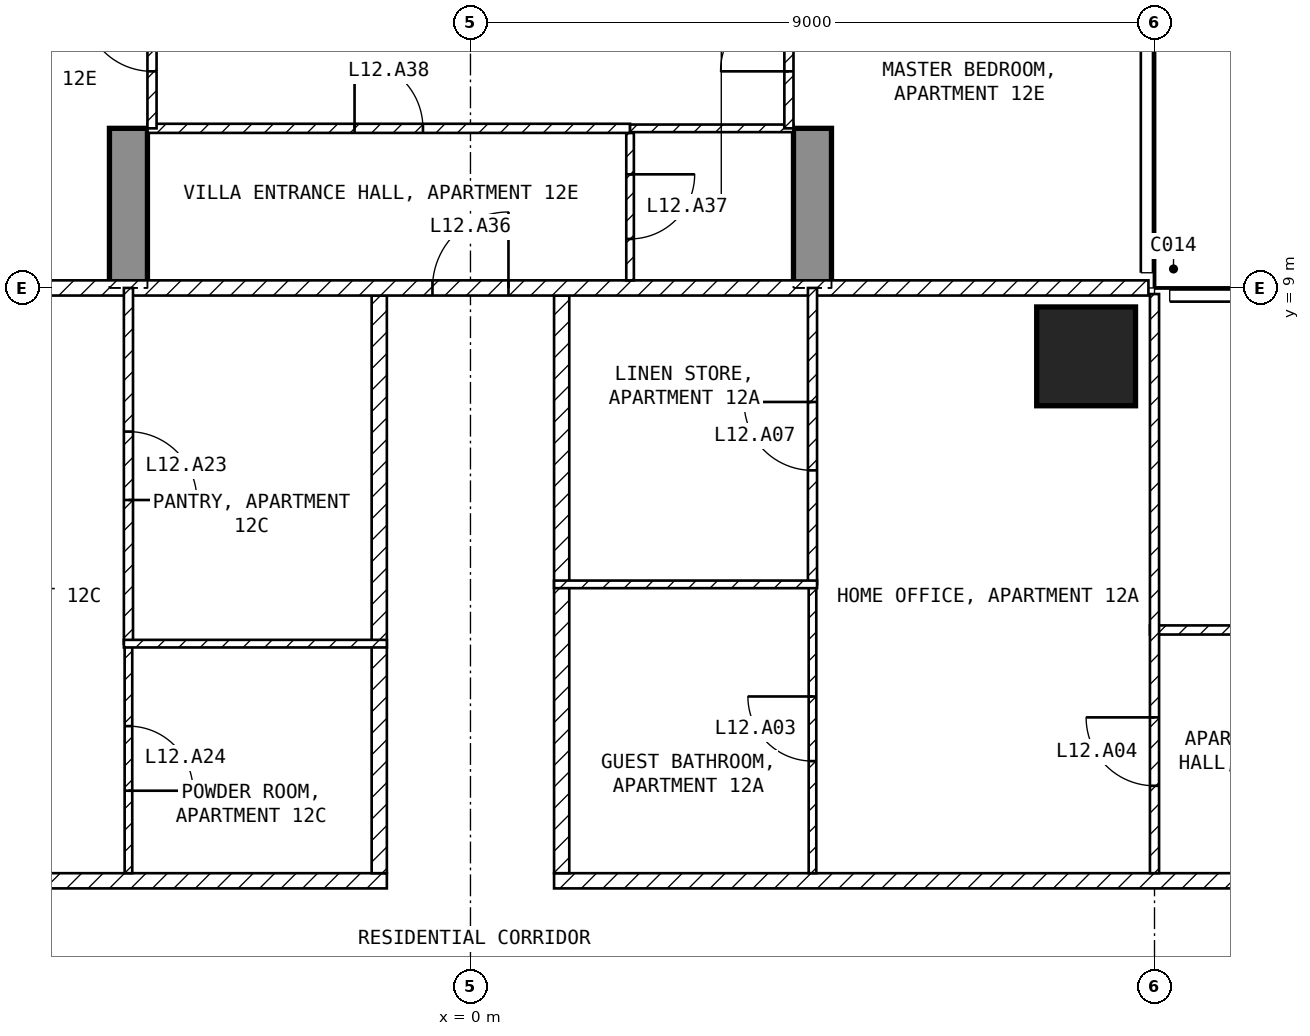
"""IFC4 building model, lengths in metres.
Left out: names, types, materials, properties, quantities, classifications, styles, units other than length and angle.
Written with IfcOpenShell. Run it as: python <this file> out.ifc"""

import sys

from ifc_helpers import new_model, si_unit, direction, frame, frame_2d, origin, origin_2d, place, context, subcontext, project, spatial, polyline, rectangle, outline, extrude, element, fill, save


model = new_model("IFC4")
c1 = context("Model", 3, precision=1e-05, world=origin(), true_north=direction((0.0, 1.0)))
c2 = subcontext(c1, "Body", "Model", "MODEL_VIEW")
j1 = project(units=[si_unit("LENGTHUNIT", "METRE"), si_unit("PLANEANGLEUNIT", "RADIAN")], contexts=[c1])
p1 = place(None, origin())
s1 = spatial("IfcSite", under=j1, at=p1, CompositionType="ELEMENT")
p2 = place(p1, origin())
s2 = spatial("IfcBuilding", under=s1, at=p2, CompositionType="ELEMENT")
p3 = place(p2, frame((0.0, 0.0, 61.0)))
s3 = spatial("IfcBuildingStorey", under=s2, at=p3, CompositionType="ELEMENT", Elevation=61.0)
p4 = place(p3, frame((8.1, 8.1, -0.25), z_axis=(0.0, 0.0, 1.0), x_axis=(1.0, 0.0, 0.0)))
e1 = element("IfcColumn", 1, at=p4, inside=s3, PredefinedType="COLUMN", context=c2, shape_type="SweptSolid", body=[
    extrude(rectangle(XDim=1.3, YDim=1.3, at=origin_2d()), origin(), (0.0, 0.0, 1.0), 3.5),
])
for number, where, z_axis, x_axis in (
    (2, (-4.75, 9.0, -0.25), (1.0, 0.0, 0.0), (0.0, 1.0, 0.0)),
    (3, (4.25, 9.0, -0.25), (1.0, 0.0, 0.0), (0.0, 1.0, 0.0)),
):
    element("IfcWall", number, at=place(p3, frame(where, z_axis=z_axis, x_axis=x_axis)), inside=s3, PredefinedType="SHEAR", context=c2, shape_type="SweptSolid", body=[
        extrude(outline(polyline([(0.0, 0.0), (2.1, 0.0), (2.1, 2.65), (4.5, 2.65), (4.5, 0.0), (9.9, 0.0), (9.9, 2.65), (12.3, 2.65), (12.3, 0.0), (16.45, 0.0), (16.45, 3.5), (0.0, 3.5), (0.0, 0.0)])), origin(), (0.0, 0.0, 1.0), 0.5),
    ])
p5 = place(p3, frame((1.1, 1.2, 0.0), z_axis=(0.0, 0.0, 1.0), x_axis=(1.0, 0.0, 0.0)))
e4 = element("IfcWall", 4, at=p5, inside=s3, PredefinedType="PARTITIONING", context=c2, shape_type="SweptSolid", body=[
    extrude(rectangle(XDim=20.5, YDim=0.2, at=frame_2d((10.25, 0.0))), origin(), (0.0, 0.0, 1.0), 3.25),
])
p6 = place(p5, frame((9.2, 0.0, 0.0)))
e5 = element("IfcOpeningElement", 5, at=p6, cuts=e4, PredefinedType="OPENING", context=c2, shape_type="SweptSolid", body=[
    extrude(rectangle(XDim=1.0, YDim=2.1, at=frame_2d((0.5, 1.05))), frame((0.0, 0.11, 0.0), z_axis=(0.0, -1.0, 0.0), x_axis=(1.0, 0.0, 0.0)), (0.0, 0.0, 1.0), 0.22),
])
p7 = place(p3, frame((1.2, 8.9, 0.0), z_axis=(0.0, 0.0, 1.0), x_axis=(0.0, -1.0, 0.0)))
e6 = element("IfcWall", 6, at=p7, inside=s3, PredefinedType="PARTITIONING", context=c2, shape_type="SweptSolid", body=[
    extrude(rectangle(XDim=7.6, YDim=0.2, at=frame_2d((3.8, 0.0))), origin(), (0.0, 0.0, 1.0), 3.25),
])
p8 = place(p3, frame((-21.6, 1.2, 0.0), z_axis=(0.0, 0.0, 1.0), x_axis=(1.0, 0.0, 0.0)))
e7 = element("IfcWall", 7, at=p8, inside=s3, PredefinedType="PARTITIONING", context=c2, shape_type="SweptSolid", body=[
    extrude(rectangle(XDim=20.5, YDim=0.2, at=frame_2d((10.25, 0.0))), origin(), (0.0, 0.0, 1.0), 3.25),
])
p9 = place(p8, frame((10.3, 0.0, 0.0)))
e8 = element("IfcOpeningElement", 8, at=p9, cuts=e7, PredefinedType="OPENING", context=c2, shape_type="SweptSolid", body=[
    extrude(rectangle(XDim=1.0, YDim=2.1, at=frame_2d((0.5, 1.05))), frame((0.0, 0.11, 0.0), z_axis=(0.0, -1.0, 0.0), x_axis=(1.0, 0.0, 0.0)), (0.0, 0.0, 1.0), 0.22),
])
p10 = place(p3, frame((-1.2, 1.3, 0.0), z_axis=(0.0, 0.0, 1.0), x_axis=(0.0, 1.0, 0.0)))
e9 = element("IfcWall", 9, at=p10, inside=s3, PredefinedType="PARTITIONING", context=c2, shape_type="SweptSolid", body=[
    extrude(rectangle(XDim=7.6, YDim=0.2, at=frame_2d((3.8, 0.0))), origin(), (0.0, 0.0, 1.0), 3.25),
])
p11 = place(p3, frame((-8.92, 9.0, 0.0), z_axis=(0.0, 0.0, 1.0), x_axis=(1.0, 0.0, 0.0)))
e10 = element("IfcWall", 10, at=p11, inside=s3, PredefinedType="PARTITIONING", context=c2, shape_type="SweptSolid", body=[
    extrude(rectangle(XDim=17.84, YDim=0.2, at=frame_2d((8.92, 0.0))), origin(), (0.0, 0.0, 1.0), 3.25),
])
p12 = place(p11, frame((8.42, 0.0, 0.0)))
e11 = element("IfcOpeningElement", 11, at=p12, cuts=e10, PredefinedType="OPENING", context=c2, shape_type="SweptSolid", body=[
    extrude(rectangle(XDim=1.0, YDim=2.1, at=frame_2d((0.5, 1.05))), frame((0.0, 0.11, 0.0), z_axis=(0.0, -1.0, 0.0), x_axis=(1.0, 0.0, 0.0)), (0.0, 0.0, 1.0), 0.22),
])
p13 = place(p3, frame((8.94, 4.5, 0.0), z_axis=(0.0, 0.0, 1.0), x_axis=(1.0, 0.0, 0.0)))
e12 = element("IfcWall", 12, at=p13, inside=s3, PredefinedType="PARTITIONING", context=c2, shape_type="SweptSolid", body=[
    extrude(rectangle(XDim=8.46, YDim=0.12, at=frame_2d((4.23, 0.0))), origin(), (0.0, 0.0, 1.0), 3.25),
])
p14 = place(p13, frame((7.11, 0.0, 0.0)))
e13 = element("IfcOpeningElement", 13, at=p14, cuts=e12, PredefinedType="OPENING", context=c2, shape_type="SweptSolid", body=[
    extrude(rectangle(XDim=0.9, YDim=2.1, at=frame_2d((0.45, 1.05))), frame((0.0, 0.07, 0.0), z_axis=(0.0, -1.0, 0.0), x_axis=(1.0, 0.0, 0.0)), (0.0, 0.0, 1.0), 0.14),
])
p15 = place(p13, frame((1.41, 0.0, 0.0)))
e14 = element("IfcOpeningElement", 14, at=p15, cuts=e12, PredefinedType="OPENING", context=c2, shape_type="SweptSolid", body=[
    extrude(rectangle(XDim=0.9, YDim=2.1, at=frame_2d((0.45, 1.05))), frame((0.0, 0.07, 0.0), z_axis=(0.0, -1.0, 0.0), x_axis=(1.0, 0.0, 0.0)), (0.0, 0.0, 1.0), 0.14),
])
p16 = place(p3, frame((9.0, 1.3, 0.0), z_axis=(0.0, 0.0, 1.0), x_axis=(0.0, 1.0, 0.0)))
e15 = element("IfcWall", 15, at=p16, inside=s3, PredefinedType="PARTITIONING", context=c2, shape_type="SweptSolid", body=[
    extrude(rectangle(XDim=7.62, YDim=0.12, at=frame_2d((3.81, 0.0))), origin(), (0.0, 0.0, 1.0), 3.25),
])
p17 = place(p16, frame((1.15, 0.0, 0.0)))
e16 = element("IfcOpeningElement", 16, at=p17, cuts=e15, PredefinedType="OPENING", context=c2, shape_type="SweptSolid", body=[
    extrude(rectangle(XDim=0.9, YDim=2.1, at=frame_2d((0.45, 1.05))), frame((0.0, 0.07, 0.0), z_axis=(0.0, -1.0, 0.0), x_axis=(1.0, 0.0, 0.0)), (0.0, 0.0, 1.0), 0.14),
])
p18 = place(p3, frame((4.5, 1.3, 0.0), z_axis=(0.0, 0.0, 1.0), x_axis=(0.0, 1.0, 0.0)))
e17 = element("IfcWall", 17, at=p18, inside=s3, PredefinedType="PARTITIONING", context=c2, shape_type="SweptSolid", body=[
    extrude(rectangle(XDim=3.8, YDim=0.1, at=frame_2d((1.9, 0.0))), origin(), (0.0, 0.0, 1.0), 3.25),
])
p19 = place(p18, frame((1.475, 0.0, 0.0)))
e18 = element("IfcOpeningElement", 18, at=p19, cuts=e17, PredefinedType="OPENING", context=c2, shape_type="SweptSolid", body=[
    extrude(rectangle(XDim=0.85, YDim=2.1, at=frame_2d((0.425, 1.05))), frame((0.0, 0.06, 0.0), z_axis=(0.0, -1.0, 0.0), x_axis=(1.0, 0.0, 0.0)), (0.0, 0.0, 1.0), 0.12),
])
p20 = place(p3, frame((4.5, 5.1, 0.0), z_axis=(0.0, 0.0, 1.0), x_axis=(0.0, 1.0, 0.0)))
e19 = element("IfcWall", 19, at=p20, inside=s3, PredefinedType="PARTITIONING", context=c2, shape_type="SweptSolid", body=[
    extrude(rectangle(XDim=3.9, YDim=0.12, at=frame_2d((1.95, 0.0))), origin(), (0.0, 0.0, 1.0), 3.25),
])
p21 = place(p20, frame((1.5, 0.0, 0.0)))
e20 = element("IfcOpeningElement", 20, at=p21, cuts=e19, PredefinedType="OPENING", context=c2, shape_type="SweptSolid", body=[
    extrude(rectangle(XDim=0.9, YDim=2.1, at=frame_2d((0.45, 1.05))), frame((0.0, 0.07, 0.0), z_axis=(0.0, -1.0, 0.0), x_axis=(1.0, 0.0, 0.0)), (0.0, 0.0, 1.0), 0.14),
])
p22 = place(p3, frame((1.1, 5.1, 0.0), z_axis=(0.0, 0.0, 1.0), x_axis=(1.0, 0.0, 0.0)))
e21 = element("IfcWall", 21, at=p22, inside=s3, PredefinedType="PARTITIONING", context=c2, shape_type="SweptSolid", body=[
    extrude(rectangle(XDim=3.46, YDim=0.1, at=frame_2d((1.73, 0.0))), origin(), (0.0, 0.0, 1.0), 3.25),
])
p23 = place(p3, frame((-4.5, 4.32, 0.0), z_axis=(0.0, 0.0, 1.0), x_axis=(0.0, -1.0, 0.0)))
e22 = element("IfcWall", 22, at=p23, inside=s3, PredefinedType="PARTITIONING", context=c2, shape_type="SweptSolid", body=[
    extrude(rectangle(XDim=3.02, YDim=0.1, at=frame_2d((1.51, 0.0))), origin(), (0.0, 0.0, 1.0), 3.25),
])
p24 = place(p23, frame((1.085, 0.0, 0.0)))
e23 = element("IfcOpeningElement", 23, at=p24, cuts=e22, PredefinedType="OPENING", context=c2, shape_type="SweptSolid", body=[
    extrude(rectangle(XDim=0.85, YDim=2.1, at=frame_2d((0.425, 1.05))), frame((0.0, 0.06, 0.0), z_axis=(0.0, -1.0, 0.0), x_axis=(1.0, 0.0, 0.0)), (0.0, 0.0, 1.0), 0.12),
])
p25 = place(p3, frame((-4.5, 9.0, 0.0), z_axis=(0.0, 0.0, 1.0), x_axis=(0.0, -1.0, 0.0)))
e24 = element("IfcWall", 24, at=p25, inside=s3, PredefinedType="PARTITIONING", context=c2, shape_type="SweptSolid", body=[
    extrude(rectangle(XDim=4.68, YDim=0.12, at=frame_2d((2.34, 0.0))), origin(), (0.0, 0.0, 1.0), 3.25),
])
p26 = place(p25, frame((1.89, 0.0, 0.0)))
e25 = element("IfcOpeningElement", 25, at=p26, cuts=e24, PredefinedType="OPENING", context=c2, shape_type="SweptSolid", body=[
    extrude(rectangle(XDim=0.9, YDim=2.1, at=frame_2d((0.45, 1.05))), frame((0.0, 0.07, 0.0), z_axis=(0.0, -1.0, 0.0), x_axis=(1.0, 0.0, 0.0)), (0.0, 0.0, 1.0), 0.14),
])
p27 = place(p3, frame((-4.56, 4.32, 0.0), z_axis=(0.0, 0.0, 1.0), x_axis=(1.0, 0.0, 0.0)))
e26 = element("IfcWall", 26, at=p27, inside=s3, PredefinedType="PARTITIONING", context=c2, shape_type="SweptSolid", body=[
    extrude(rectangle(XDim=3.46, YDim=0.1, at=frame_2d((1.73, 0.0))), origin(), (0.0, 0.0, 1.0), 3.25),
])
p28 = place(p3, frame((2.1, 11.04, 0.0), z_axis=(0.0, 0.0, 1.0), x_axis=(0.0, -1.0, 0.0)))
e27 = element("IfcWall", 27, at=p28, inside=s3, PredefinedType="PARTITIONING", context=c2, shape_type="SweptSolid", body=[
    extrude(rectangle(XDim=1.94, YDim=0.1, at=frame_2d((0.97, 0.0))), origin(), (0.0, 0.0, 1.0), 3.25),
])
p29 = place(p28, frame((0.545, 0.0, 0.0)))
e28 = element("IfcOpeningElement", 28, at=p29, cuts=e27, PredefinedType="OPENING", context=c2, shape_type="SweptSolid", body=[
    extrude(rectangle(XDim=0.85, YDim=2.1, at=frame_2d((0.425, 1.05))), frame((0.0, 0.06, 0.0), z_axis=(0.0, -1.0, 0.0), x_axis=(1.0, 0.0, 0.0)), (0.0, 0.0, 1.0), 0.12),
])
p30 = place(p3, frame((-4.25, 11.1, 0.0), z_axis=(0.0, 0.0, 1.0), x_axis=(1.0, 0.0, 0.0)))
e29 = element("IfcWall", 29, at=p30, inside=s3, PredefinedType="PARTITIONING", context=c2, shape_type="SweptSolid", body=[
    extrude(rectangle(XDim=6.35, YDim=0.12, at=frame_2d((3.175, 0.0))), origin(), (0.0, 0.0, 1.0), 3.25),
])
p31 = place(p30, frame((2.725, 0.0, 0.0)))
e30 = element("IfcOpeningElement", 30, at=p31, cuts=e29, PredefinedType="OPENING", context=c2, shape_type="SweptSolid", body=[
    extrude(rectangle(XDim=0.9, YDim=2.1, at=frame_2d((0.45, 1.05))), frame((0.0, 0.07, 0.0), z_axis=(0.0, -1.0, 0.0), x_axis=(1.0, 0.0, 0.0)), (0.0, 0.0, 1.0), 0.14),
])
p32 = place(p3, frame((2.1, 11.1, 0.0), z_axis=(0.0, 0.0, 1.0), x_axis=(1.0, 0.0, 0.0)))
e31 = element("IfcWall", 31, at=p32, inside=s3, PredefinedType="PARTITIONING", context=c2, shape_type="SweptSolid", body=[
    extrude(rectangle(XDim=2.15, YDim=0.1, at=frame_2d((1.075, 0.0))), origin(), (0.0, 0.0, 1.0), 3.25),
])
p33 = place(p3, frame((4.19, 11.1, 0.0), z_axis=(0.0, 0.0, 1.0), x_axis=(0.0, 1.0, 0.0)))
e32 = element("IfcWall", 32, at=p33, inside=s3, PredefinedType="PARTITIONING", context=c2, shape_type="SweptSolid", body=[
    extrude(rectangle(XDim=2.4, YDim=0.12, at=frame_2d((1.2, 0.0))), origin(), (0.0, 0.0, 1.0), 2.4),
])
p34 = place(p33, frame((0.75, 0.0, 0.0)))
e33 = element("IfcOpeningElement", 33, at=p34, cuts=e32, PredefinedType="OPENING", context=c2, shape_type="SweptSolid", body=[
    extrude(rectangle(XDim=0.9, YDim=2.1, at=frame_2d((0.45, 1.05))), frame((0.0, 0.07, 0.0), z_axis=(0.0, -1.0, 0.0), x_axis=(1.0, 0.0, 0.0)), (0.0, 0.0, 1.0), 0.14),
])
p35 = place(p3, frame((-4.19, 11.1, 0.0), z_axis=(0.0, 0.0, 1.0), x_axis=(0.0, 1.0, 0.0)))
e34 = element("IfcWall", 34, at=p35, inside=s3, PredefinedType="PARTITIONING", context=c2, shape_type="SweptSolid", body=[
    extrude(rectangle(XDim=2.4, YDim=0.12, at=frame_2d((1.2, 0.0))), origin(), (0.0, 0.0, 1.0), 2.4),
])
p36 = place(p35, frame((0.75, 0.0, 0.0)))
e35 = element("IfcOpeningElement", 35, at=p36, cuts=e34, PredefinedType="OPENING", context=c2, shape_type="SweptSolid", body=[
    extrude(rectangle(XDim=0.9, YDim=2.1, at=frame_2d((0.45, 1.05))), frame((0.0, 0.07, 0.0), z_axis=(0.0, -1.0, 0.0), x_axis=(1.0, 0.0, 0.0)), (0.0, 0.0, 1.0), 0.14),
])
p37 = place(p19, origin())
e36 = element("IfcDoor", 36, at=p37, inside=s3, OperationType="SINGLE_SWING_RIGHT", PredefinedType="DOOR", context=c2, shape_type="SweptSolid", body=[
    extrude(rectangle(XDim=0.85, YDim=2.1, at=frame_2d((0.425, 1.05))), frame((0.0, 0.025, 0.0), z_axis=(0.0, -1.0, 0.0), x_axis=(1.0, 0.0, 0.0)), (0.0, 0.0, 1.0), 0.05),
])
fill(e18, e36)
p38 = place(p17, origin())
e37 = element("IfcDoor", 37, at=p38, inside=s3, OperationType="SINGLE_SWING_RIGHT", PredefinedType="DOOR", context=c2, shape_type="SweptSolid", body=[
    extrude(rectangle(XDim=0.9, YDim=2.1, at=frame_2d((0.45, 1.05))), frame((0.0, 0.025, 0.0), z_axis=(0.0, -1.0, 0.0), x_axis=(1.0, 0.0, 0.0)), (0.0, 0.0, 1.0), 0.05),
])
fill(e16, e37)
p39 = place(p21, origin())
e38 = element("IfcDoor", 38, at=p39, inside=s3, OperationType="SINGLE_SWING_RIGHT", PredefinedType="DOOR", context=c2, shape_type="SweptSolid", body=[
    extrude(rectangle(XDim=0.9, YDim=2.1, at=frame_2d((0.45, 1.05))), frame((0.0, 0.025, 0.0), z_axis=(0.0, -1.0, 0.0), x_axis=(1.0, 0.0, 0.0)), (0.0, 0.0, 1.0), 0.05),
])
fill(e20, e38)
p40 = place(p26, origin())
e39 = element("IfcDoor", 39, at=p40, inside=s3, OperationType="SINGLE_SWING_RIGHT", PredefinedType="DOOR", context=c2, shape_type="SweptSolid", body=[
    extrude(rectangle(XDim=0.9, YDim=2.1, at=frame_2d((0.45, 1.05))), frame((0.0, 0.025, 0.0), z_axis=(0.0, -1.0, 0.0), x_axis=(1.0, 0.0, 0.0)), (0.0, 0.0, 1.0), 0.05),
])
fill(e25, e39)
p41 = place(p24, origin())
e40 = element("IfcDoor", 40, at=p41, inside=s3, OperationType="SINGLE_SWING_RIGHT", PredefinedType="DOOR", context=c2, shape_type="SweptSolid", body=[
    extrude(rectangle(XDim=0.85, YDim=2.1, at=frame_2d((0.425, 1.05))), frame((0.0, 0.025, 0.0), z_axis=(0.0, -1.0, 0.0), x_axis=(1.0, 0.0, 0.0)), (0.0, 0.0, 1.0), 0.05),
])
fill(e23, e40)
p42 = place(p12, origin())
e41 = element("IfcDoor", 41, at=p42, inside=s3, OperationType="SINGLE_SWING_RIGHT", PredefinedType="DOOR", context=c2, shape_type="SweptSolid", body=[
    extrude(rectangle(XDim=1.0, YDim=2.1, at=frame_2d((0.5, 1.05))), frame((0.0, 0.025, 0.0), z_axis=(0.0, -1.0, 0.0), x_axis=(1.0, 0.0, 0.0)), (0.0, 0.0, 1.0), 0.05),
])
fill(e11, e41)
p43 = place(p29, origin())
e42 = element("IfcDoor", 42, at=p43, inside=s3, OperationType="SINGLE_SWING_LEFT", PredefinedType="DOOR", context=c2, shape_type="SweptSolid", body=[
    extrude(rectangle(XDim=0.85, YDim=2.1, at=frame_2d((0.425, 1.05))), frame((0.0, 0.025, 0.0), z_axis=(0.0, -1.0, 0.0), x_axis=(1.0, 0.0, 0.0)), (0.0, 0.0, 1.0), 0.05),
])
fill(e28, e42)
p44 = place(p31, origin())
e43 = element("IfcDoor", 43, at=p44, inside=s3, OperationType="SINGLE_SWING_LEFT", PredefinedType="DOOR", context=c2, shape_type="SweptSolid", body=[
    extrude(rectangle(XDim=0.9, YDim=2.1, at=frame_2d((0.45, 1.05))), frame((0.0, 0.025, 0.0), z_axis=(0.0, -1.0, 0.0), x_axis=(1.0, 0.0, 0.0)), (0.0, 0.0, 1.0), 0.05),
])
fill(e30, e43)
p45 = place(p34, origin())
e44 = element("IfcDoor", 44, at=p45, inside=s3, OperationType="SINGLE_SWING_LEFT", PredefinedType="DOOR", context=c2, shape_type="SweptSolid", body=[
    extrude(rectangle(XDim=0.9, YDim=2.1, at=frame_2d((0.45, 1.05))), frame((0.0, 0.025, 0.0), z_axis=(0.0, -1.0, 0.0), x_axis=(1.0, 0.0, 0.0)), (0.0, 0.0, 1.0), 0.05),
])
fill(e33, e44)
p46 = place(p36, origin())
e45 = element("IfcDoor", 45, at=p46, inside=s3, OperationType="SINGLE_SWING_RIGHT", PredefinedType="DOOR", context=c2, shape_type="SweptSolid", body=[
    extrude(rectangle(XDim=0.9, YDim=2.1, at=frame_2d((0.45, 1.05))), frame((0.0, 0.025, 0.0), z_axis=(0.0, -1.0, 0.0), x_axis=(1.0, 0.0, 0.0)), (0.0, 0.0, 1.0), 0.05),
])
fill(e35, e45)
save(model, sys.argv[1])
